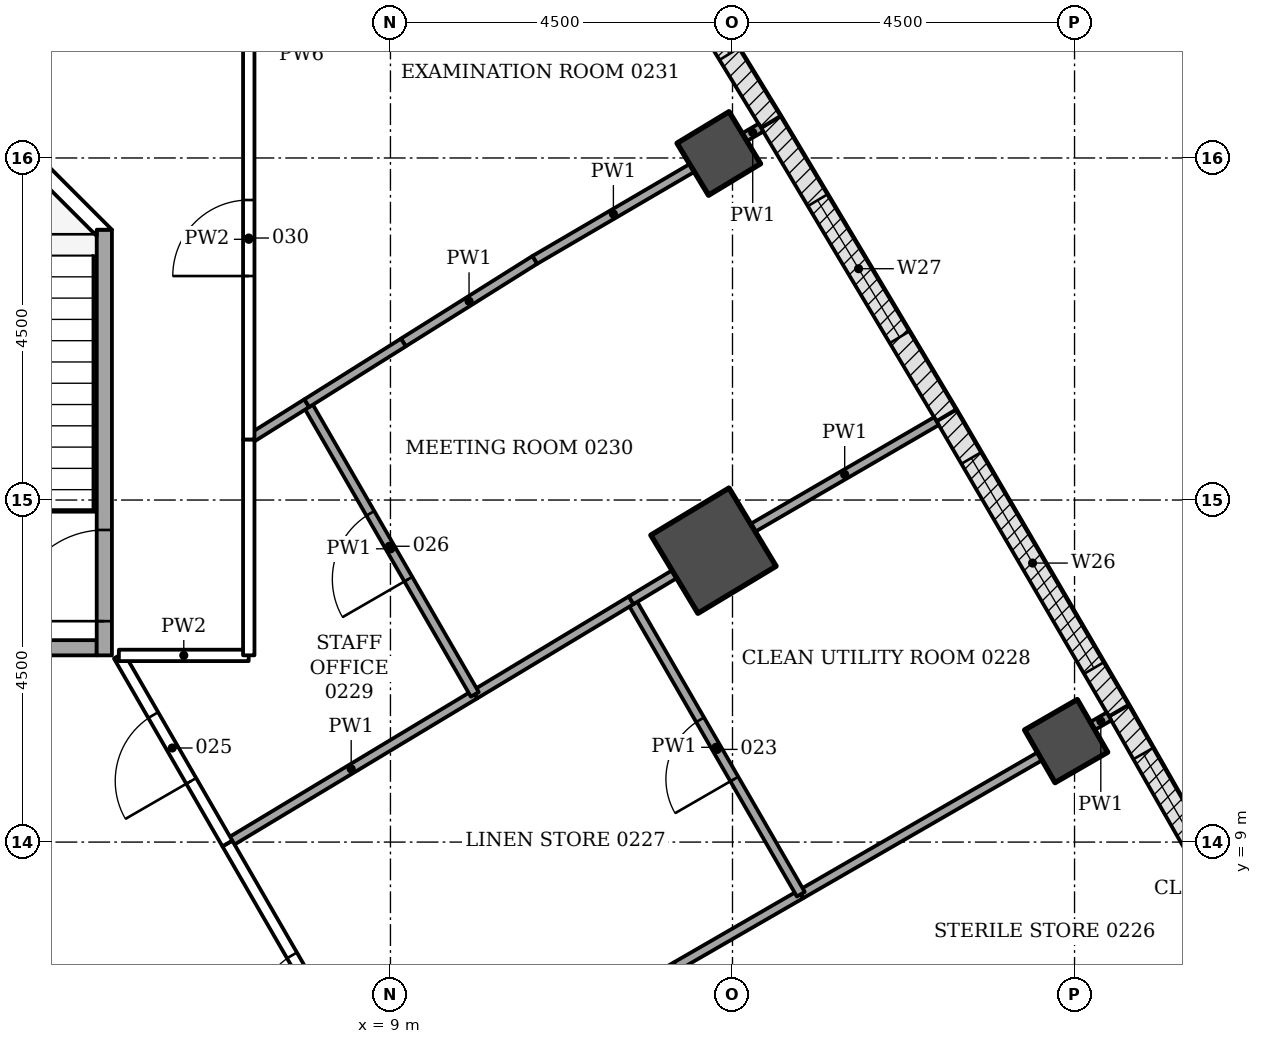
"""IFC4 building model, lengths in metres.
Left out: names, types, materials, properties, quantities, classifications, styles, units other than length and angle.
Written with IfcOpenShell. Run it as: python <this file> out.ifc"""

import sys

from ifc_helpers import new_model, si_unit, direction, frame, frame_2d, origin, origin_2d, place, context, subcontext, project, spatial, polyline, rectangle, outline, extrude, element, fill, save


model = new_model("IFC4")
c1 = context("Model", 3, precision=1e-05, world=origin(), true_north=direction((0.0, 1.0)))
c2 = subcontext(c1, "Body", "Model", "MODEL_VIEW")
j1 = project(units=[si_unit("LENGTHUNIT", "METRE"), si_unit("PLANEANGLEUNIT", "RADIAN")], contexts=[c1])
p1 = place(None, origin())
s1 = spatial("IfcSite", under=j1, at=p1, CompositionType="ELEMENT")
p2 = place(p1, origin())
s2 = spatial("IfcBuilding", under=s1, at=p2, CompositionType="ELEMENT")
p3 = place(p2, frame((0.0, 0.0, 10.5)))
s3 = spatial("IfcBuildingStorey", under=s2, at=p3, CompositionType="ELEMENT", Elevation=10.5)
p4 = place(p3, frame((13.25, 12.834, -0.25), z_axis=(0.0, 0.0, 1.0), x_axis=(0.856599929156, 0.515981163775, 0.0)))
e1 = element("IfcColumn", 1, at=p4, inside=s3, PredefinedType="COLUMN", context=c2, shape_type="SweptSolid", body=[
    extrude(rectangle(XDim=1.2, YDim=1.2, at=origin_2d()), origin(), (0.0, 0.0, 1.0), 4.5),
])
for number, where, z_axis, x_axis in (
    (2, (17.89, 10.329, -0.25), (0.0, 0.0, 1.0), (0.866, 0.5, 0.0)),
    (3, (13.32, 18.059, -0.25), (0.0, 0.0, 1.0), (0.856, 0.518, 0.0)),
):
    element("IfcColumn", number, at=place(p3, frame(where, z_axis=z_axis, x_axis=x_axis)), inside=s3, PredefinedType="COLUMN", context=c2, shape_type="SweptSolid", body=[
        extrude(rectangle(XDim=0.8, YDim=0.8, at=origin_2d()), origin(), (0.0, 0.0, 1.0), 4.5),
    ])
p5 = place(p3, frame((10.311, -4.703, -0.25), z_axis=(0.0, 0.0, 1.0), x_axis=(-0.500001446645, 0.866024568562, 0.0)))
e4 = element("IfcWall", 4, at=p5, inside=s3, PredefinedType="SHEAR", context=c2, shape_type="SweptSolid", body=[
    extrude(rectangle(XDim=18.458, YDim=0.7, at=frame_2d((9.229, 0.0))), origin(), (0.0, 0.0, 1.0), 4.5),
])
p6 = place(p5, frame((8.7, 0.0, 0.25)))
e5 = element("IfcOpeningElement", 5, at=p6, cuts=e4, PredefinedType="OPENING", context=c2, shape_type="SweptSolid", body=[
    extrude(rectangle(XDim=1.0, YDim=2.1, at=frame_2d((0.5, 1.05))), frame((0.0, 0.36, 0.0), z_axis=(0.0, -1.0, 0.0), x_axis=(1.0, 0.0, 0.0)), (0.0, 0.0, 1.0), 0.72),
])
p7 = place(p5, frame((4.002, 0.0, 0.25)))
e6 = element("IfcOpeningElement", 6, at=p7, cuts=e4, PredefinedType="OPENING", context=c2, shape_type="SweptSolid", body=[
    extrude(rectangle(XDim=0.9, YDim=2.1, at=frame_2d((0.45, 1.05))), frame((0.0, 0.36, 0.0), z_axis=(0.0, -1.0, 0.0), x_axis=(1.0, 0.0, 0.0)), (0.0, 0.0, 1.0), 0.72),
])
p8 = place(p5, frame((14.093, 0.0, 0.25)))
e7 = element("IfcOpeningElement", 7, at=p8, cuts=e4, PredefinedType="OPENING", context=c2, shape_type="SweptSolid", body=[
    extrude(rectangle(XDim=0.9, YDim=2.1, at=frame_2d((0.45, 1.05))), frame((0.0, 0.36, 0.0), z_axis=(0.0, -1.0, 0.0), x_axis=(1.0, 0.0, 0.0)), (0.0, 0.0, 1.0), 0.72),
])
p9 = place(p3, frame((18.583, 10.728, 0.0), z_axis=(0.0, 0.0, 1.0), x_axis=(0.495524760411, -0.868593812907, 0.0)))
e8 = element("IfcWall", 8, at=p9, inside=s3, PredefinedType="NOTDEFINED", context=c2, shape_type="SweptSolid", body=[
    extrude(rectangle(XDim=4.496, YDim=0.3, at=frame_2d((2.248, 0.0))), origin(), (0.0, 0.0, 1.0), 4.25),
])
p10 = place(p9, frame((0.648, 0.0, 0.8)))
e9 = element("IfcOpeningElement", 9, at=p10, cuts=e8, PredefinedType="OPENING", context=c2, shape_type="SweptSolid", body=[
    extrude(rectangle(XDim=3.2, YDim=2.7, at=frame_2d((1.6, 1.35))), frame((0.0, 0.16, 0.0), z_axis=(0.0, -1.0, 0.0), x_axis=(1.0, 0.0, 0.0)), (0.0, 0.0, 1.0), 0.32),
])
p11 = place(p3, frame((16.314, 14.612, 0.0), z_axis=(0.0, 0.0, 1.0), x_axis=(0.50445499627, -0.86343798662, 0.0)))
e10 = element("IfcWall", 10, at=p11, inside=s3, PredefinedType="NOTDEFINED", context=c2, shape_type="SweptSolid", body=[
    extrude(rectangle(XDim=4.496, YDim=0.3, at=frame_2d((2.248, 0.0))), origin(), (0.0, 0.0, 1.0), 4.25),
])
p12 = place(p11, frame((0.648, 0.0, 0.8)))
e11 = element("IfcOpeningElement", 11, at=p12, cuts=e10, PredefinedType="OPENING", context=c2, shape_type="SweptSolid", body=[
    extrude(rectangle(XDim=3.2, YDim=2.7, at=frame_2d((1.6, 1.35))), frame((0.0, 0.16, 0.0), z_axis=(0.0, -1.0, 0.0), x_axis=(1.0, 0.0, 0.0)), (0.0, 0.0, 1.0), 0.32),
])
p13 = place(p3, frame((14.005, 18.472, 0.0), z_axis=(0.0, 0.0, 1.0), x_axis=(0.513257465408, -0.858234684805, 0.0)))
e12 = element("IfcWall", 12, at=p13, inside=s3, PredefinedType="NOTDEFINED", context=c2, shape_type="SweptSolid", body=[
    extrude(rectangle(XDim=4.496, YDim=0.3, at=frame_2d((2.248, 0.0))), origin(), (0.0, 0.0, 1.0), 4.25),
])
p14 = place(p13, frame((1.198, 0.0, 0.8)))
e13 = element("IfcOpeningElement", 13, at=p14, cuts=e12, PredefinedType="OPENING", context=c2, shape_type="SweptSolid", body=[
    extrude(rectangle(XDim=2.1, YDim=3.0, at=frame_2d((1.05, 1.5))), frame((0.0, 0.16, 0.0), z_axis=(0.0, -1.0, 0.0), x_axis=(1.0, 0.0, 0.0)), (0.0, 0.0, 1.0), 0.32),
])
p15 = place(p3, frame((11.656, 22.309, 0.0), z_axis=(0.0, 0.0, 1.0), x_axis=(0.522078085402, -0.852897691838, 0.0)))
e14 = element("IfcWall", 14, at=p15, inside=s3, PredefinedType="NOTDEFINED", context=c2, shape_type="SweptSolid", body=[
    extrude(rectangle(XDim=4.496, YDim=0.3, at=frame_2d((2.248, 0.0))), origin(), (0.0, 0.0, 1.0), 4.25),
])
p16 = place(p15, frame((1.048, 0.0, 0.9)))
e15 = element("IfcOpeningElement", 15, at=p16, cuts=e14, PredefinedType="OPENING", context=c2, shape_type="SweptSolid", body=[
    extrude(rectangle(XDim=2.4, YDim=2.4, at=frame_2d((1.2, 1.2))), frame((0.0, 0.16, 0.0), z_axis=(0.0, -1.0, 0.0), x_axis=(1.0, 0.0, 0.0)), (0.0, 0.0, 1.0), 0.32),
])
p17 = place(p3, frame((5.135, 11.556, -0.25), z_axis=(0.0, 0.0, 1.0), x_axis=(-1.0, 0.0, 0.0)))
e16 = element("IfcWall", 16, at=p17, inside=s3, PredefinedType="SHEAR", context=c2, shape_type="SweptSolid", body=[
    extrude(rectangle(XDim=3.55, YDim=0.2, at=frame_2d((1.775, 0.0))), origin(), (0.0, 0.0, 1.0), 4.5),
])
p18 = place(p17, frame((1.175, 0.0, 0.25)))
e17 = element("IfcOpeningElement", 17, at=p18, cuts=e16, PredefinedType="OPENING", context=c2, shape_type="SweptSolid", body=[
    extrude(rectangle(XDim=1.2, YDim=2.1, at=frame_2d((0.6, 1.05))), frame((0.0, 0.11, 0.0), z_axis=(0.0, -1.0, 0.0), x_axis=(1.0, 0.0, 0.0)), (0.0, 0.0, 1.0), 0.22),
])
p19 = place(p3, frame((5.236, 11.456, -0.25), z_axis=(0.0, 0.0, 1.0), x_axis=(0.0, 1.0, 0.0)))
e18 = element("IfcWall", 18, at=p19, inside=s3, PredefinedType="SHEAR", context=c2, shape_type="SweptSolid", body=[
    extrude(rectangle(XDim=5.6, YDim=0.2, at=frame_2d((2.8, 0.0))), origin(), (0.0, 0.0, 1.0), 4.5),
])
p20 = place(p19, frame((0.45, 0.0, 0.25)))
e19 = element("IfcOpeningElement", 19, at=p20, cuts=e18, PredefinedType="OPENING", context=c2, shape_type="SweptSolid", body=[
    extrude(rectangle(XDim=1.2, YDim=2.1, at=frame_2d((0.6, 1.05))), frame((0.0, 0.11, 0.0), z_axis=(0.0, -1.0, 0.0), x_axis=(1.0, 0.0, 0.0)), (0.0, 0.0, 1.0), 0.22),
])
p21 = place(p3, frame((0.0, 0.0, -0.25)))
e20 = element("IfcWall", 20, at=p21, inside=s3, PredefinedType="SHEAR", context=c2, shape_type="SweptSolid", body=[
    extrude(outline(polyline([(5.336, 17.056), (3.736, 18.656), (1.586, 18.656), (1.586, 18.456), (3.653, 18.456), (5.135, 16.974), (5.135, 17.056), (5.135, 17.056), (5.135, 17.056), (5.135, 17.056), (5.135, 17.056), (5.135, 17.056), (5.135, 17.056), (5.135, 17.056), (5.135, 17.056), (5.135, 17.056), (5.135, 17.056), (5.135, 17.056), (5.135, 17.056), (5.135, 17.056), (5.135, 17.056), (5.135, 17.056), (5.135, 17.056), (5.336, 17.056)])), origin(), (0.0, 0.0, 1.0), 4.5),
])
p22 = place(p3, frame((9.03, 5.215, 0.0), z_axis=(0.0, 0.0, 1.0), x_axis=(-0.500239242508, 0.86588723299, 0.0)))
e21 = element("IfcWall", 21, at=p22, inside=s3, PredefinedType="PARTITIONING", context=c2, shape_type="SweptSolid", body=[
    extrude(rectangle(XDim=4.348, YDim=0.15, at=frame_2d((2.174, 0.0))), origin(), (0.0, 0.0, 1.0), 3.638),
])
p23 = place(p22, frame((1.75, 0.0, 0.0)))
e22 = element("IfcOpeningElement", 22, at=p23, cuts=e21, PredefinedType="OPENING", context=c2, shape_type="SweptSolid", body=[
    extrude(rectangle(XDim=0.9, YDim=2.1, at=frame_2d((0.45, 1.05))), frame((0.0, 0.085, 0.0), z_axis=(0.0, -1.0, 0.0), x_axis=(1.0, 0.0, 0.0)), (0.0, 0.0, 1.0), 0.17),
])
p24 = place(p3, frame((6.854, 8.982, 0.0), z_axis=(0.0, 0.0, 1.0), x_axis=(-0.499919889281, 0.866071650789, 0.0)))
e23 = element("IfcWall", 23, at=p24, inside=s3, PredefinedType="PARTITIONING", context=c2, shape_type="SweptSolid", body=[
    extrude(rectangle(XDim=2.854, YDim=0.15, at=frame_2d((1.427, 0.0))), origin(), (0.0, 0.0, 1.0), 3.638),
])
p25 = place(p24, frame((0.95, 0.0, 0.0)))
e24 = element("IfcOpeningElement", 24, at=p25, cuts=e23, PredefinedType="OPENING", context=c2, shape_type="SweptSolid", body=[
    extrude(rectangle(XDim=1.0, YDim=2.1, at=frame_2d((0.5, 1.05))), frame((0.0, 0.085, 0.0), z_axis=(0.0, -1.0, 0.0), x_axis=(1.0, 0.0, 0.0)), (0.0, 0.0, 1.0), 0.17),
])
p26 = place(p3, frame((5.427, 11.456, 0.0), z_axis=(0.0, 0.0, 1.0), x_axis=(1.0, 0.0, 0.0)))
e25 = element("IfcWall", 25, at=p26, inside=s3, PredefinedType="PARTITIONING", context=c2, shape_type="SweptSolid", body=[
    extrude(rectangle(XDim=1.708, YDim=0.15, at=frame_2d((0.854, 0.0))), origin(), (0.0, 0.0, 1.0), 4.25),
])
p27 = place(p3, frame((7.136, 11.457, 0.0), z_axis=(0.0, 0.0, 1.0), x_axis=(0.0, 1.0, 0.0)))
e26 = element("IfcWall", 26, at=p27, inside=s3, PredefinedType="PARTITIONING", context=c2, shape_type="SweptSolid", body=[
    extrude(rectangle(XDim=2.84, YDim=0.15, at=frame_2d((1.42, 0.0))), origin(), (0.0, 0.0, 1.0), 3.638),
])
p28 = place(p3, frame((7.136, 14.297, 0.0), z_axis=(0.0, 0.0, 1.0), x_axis=(0.0, 1.0, 0.0)))
e27 = element("IfcWall", 27, at=p28, inside=s3, PredefinedType="PARTITIONING", context=c2, shape_type="SweptSolid", body=[
    extrude(rectangle(XDim=5.266, YDim=0.15, at=frame_2d((2.633, 0.0))), origin(), (0.0, 0.0, 1.0), 3.638),
])
p29 = place(p28, frame((2.15, 0.0, 0.0)))
e28 = element("IfcOpeningElement", 28, at=p29, cuts=e27, PredefinedType="OPENING", context=c2, shape_type="SweptSolid", body=[
    extrude(rectangle(XDim=1.0, YDim=2.1, at=frame_2d((0.5, 1.05))), frame((0.0, 0.085, 0.0), z_axis=(0.0, -1.0, 0.0), x_axis=(1.0, 0.0, 0.0)), (0.0, 0.0, 1.0), 0.17),
])
p30 = place(p3, frame((12.755, 7.363, 0.0), z_axis=(0.0, 0.0, 1.0), x_axis=(-0.866173292352, -0.499743761959, 0.0)))
e29 = element("IfcWall", 29, at=p30, inside=s3, PredefinedType="PARTITIONING", context=c2, shape_type="SweptSolid", body=[
    extrude(rectangle(XDim=4.298, YDim=0.12, at=frame_2d((2.149, 0.0))), origin(), (0.0, 0.0, 1.0), 3.638),
])
p31 = place(p3, frame((14.4, 8.313, 0.0), z_axis=(0.0, 0.0, 1.0), x_axis=(-0.865980106173, -0.500078449558, 0.0)))
e30 = element("IfcWall", 30, at=p31, inside=s3, PredefinedType="PARTITIONING", context=c2, shape_type="SweptSolid", body=[
    extrude(rectangle(XDim=1.9, YDim=0.12, at=frame_2d((0.95, 0.0))), origin(), (0.0, 0.0, 1.0), 3.638),
])
p32 = place(p3, frame((17.543, 10.128, 0.0), z_axis=(0.0, 0.0, 1.0), x_axis=(-0.866039913117, -0.499974868256, 0.0)))
e31 = element("IfcWall", 31, at=p32, inside=s3, PredefinedType="PARTITIONING", context=c2, shape_type="SweptSolid", body=[
    extrude(rectangle(XDim=3.628, YDim=0.12, at=frame_2d((1.814, 0.0))), origin(), (0.0, 0.0, 1.0), 3.638),
])
p33 = place(p3, frame((18.454, 10.653, 0.0), z_axis=(0.0, 0.0, 1.0), x_axis=(-0.866558586415, -0.499075361355, 0.0)))
e32 = element("IfcWall", 32, at=p33, inside=s3, PredefinedType="PARTITIONING", context=c2, shape_type="SweptSolid", body=[
    extrude(rectangle(XDim=0.25, YDim=0.12, at=frame_2d((0.125, 0.0))), origin(), (0.0, 0.0, 1.0), 4.25),
])
p34 = place(p3, frame((14.399, 8.314, 0.0), z_axis=(0.0, 0.0, 1.0), x_axis=(-0.49998599166, 0.866033491352, 0.0)))
e33 = element("IfcWall", 33, at=p34, inside=s3, PredefinedType="PARTITIONING", context=c2, shape_type="SweptSolid", body=[
    extrude(rectangle(XDim=4.464, YDim=0.12, at=frame_2d((2.232, 0.0))), origin(), (0.0, 0.0, 1.0), 3.638),
])
p35 = place(p34, frame((1.75, 0.0, 0.0)))
e34 = element("IfcOpeningElement", 34, at=p35, cuts=e33, PredefinedType="OPENING", context=c2, shape_type="SweptSolid", body=[
    extrude(rectangle(XDim=0.9, YDim=2.1, at=frame_2d((0.45, 1.05))), frame((0.0, 0.07, 0.0), z_axis=(0.0, -1.0, 0.0), x_axis=(1.0, 0.0, 0.0)), (0.0, 0.0, 1.0), 0.14),
])
p36 = place(p3, frame((10.111, 10.942, 0.0), z_axis=(0.0, 0.0, 1.0), x_axis=(-0.856692501001, -0.515827450539, 0.0)))
e35 = element("IfcWall", 35, at=p36, inside=s3, PredefinedType="PARTITIONING", context=c2, shape_type="SweptSolid", body=[
    extrude(rectangle(XDim=3.8, YDim=0.12, at=frame_2d((1.9, 0.0))), origin(), (0.0, 0.0, 1.0), 3.638),
])
p37 = place(p3, frame((12.167, 12.181, 0.0), z_axis=(0.0, 0.0, 1.0), x_axis=(-0.856602650019, -0.515976646739, 0.0)))
e36 = element("IfcWall", 36, at=p37, inside=s3, PredefinedType="PARTITIONING", context=c2, shape_type="SweptSolid", body=[
    extrude(rectangle(XDim=2.399, YDim=0.12, at=frame_2d((1.199, 0.0))), origin(), (0.0, 0.0, 1.0), 3.638),
])
p38 = place(p3, frame((12.736, 12.524, 0.0), z_axis=(0.0, 0.0, 1.0), x_axis=(-0.856453764076, -0.516223740252, 0.0)))
e37 = element("IfcWall", 37, at=p38, inside=s3, PredefinedType="PARTITIONING", context=c2, shape_type="SweptSolid", body=[
    extrude(rectangle(XDim=0.665, YDim=0.12, at=frame_2d((0.332, 0.0))), origin(), (0.0, 0.0, 1.0), 3.638),
])
p39 = place(p3, frame((16.183, 14.538, 0.0), z_axis=(0.0, 0.0, 1.0), x_axis=(-0.864576979504, -0.50250039454, 0.0)))
e38 = element("IfcWall", 38, at=p39, inside=s3, PredefinedType="PARTITIONING", context=c2, shape_type="SweptSolid", body=[
    extrude(rectangle(XDim=2.792, YDim=0.12, at=frame_2d((1.396, 0.0))), origin(), (0.0, 0.0, 1.0), 3.633),
])
p40 = place(p3, frame((10.11, 10.943, 0.0), z_axis=(0.0, 0.0, 1.0), x_axis=(-0.49990879683, 0.866078053556, 0.0)))
e39 = element("IfcWall", 39, at=p40, inside=s3, PredefinedType="PARTITIONING", context=c2, shape_type="SweptSolid", body=[
    extrude(rectangle(XDim=4.423, YDim=0.12, at=frame_2d((2.211, 0.0))), origin(), (0.0, 0.0, 1.0), 3.638),
])
p41 = place(p40, frame((1.75, 0.0, 0.0)))
e40 = element("IfcOpeningElement", 40, at=p41, cuts=e39, PredefinedType="OPENING", context=c2, shape_type="SweptSolid", body=[
    extrude(rectangle(XDim=1.0, YDim=2.1, at=frame_2d((0.5, 1.05))), frame((0.0, 0.07, 0.0), z_axis=(0.0, -1.0, 0.0), x_axis=(1.0, 0.0, 0.0)), (0.0, 0.0, 1.0), 0.14),
])
p42 = place(p3, frame((7.899, 14.774, 0.0), z_axis=(0.0, 0.0, 1.0), x_axis=(-0.847402109943, -0.530951658877, 0.0)))
e41 = element("IfcWall", 41, at=p42, inside=s3, PredefinedType="PARTITIONING", context=c2, shape_type="SweptSolid", body=[
    extrude(rectangle(XDim=0.898, YDim=0.12, at=frame_2d((0.449, 0.0))), origin(), (0.0, 0.0, 1.0), 3.638),
])
p43 = place(p3, frame((12.968, 17.869, 0.0), z_axis=(0.0, 0.0, 1.0), x_axis=(-0.863161652457, -0.504927679701, 0.0)))
e42 = element("IfcWall", 42, at=p43, inside=s3, PredefinedType="PARTITIONING", context=c2, shape_type="SweptSolid", body=[
    extrude(rectangle(XDim=2.398, YDim=0.12, at=frame_2d((1.199, 0.0))), origin(), (0.0, 0.0, 1.0), 3.638),
])
p44 = place(p3, frame((10.898, 16.658, 0.0), z_axis=(0.0, 0.0, 1.0), x_axis=(-0.846907532623, -0.531740191435, 0.0)))
e43 = element("IfcWall", 43, at=p44, inside=s3, PredefinedType="PARTITIONING", context=c2, shape_type="SweptSolid", body=[
    extrude(rectangle(XDim=2.04, YDim=0.12, at=frame_2d((1.02, 0.0))), origin(), (0.0, 0.0, 1.0), 3.638),
])
p45 = place(p3, frame((9.17, 15.572, 0.0), z_axis=(0.0, 0.0, 1.0), x_axis=(-0.846881470123, -0.531781699161, 0.0)))
e44 = element("IfcWall", 44, at=p45, inside=s3, PredefinedType="PARTITIONING", context=c2, shape_type="SweptSolid", body=[
    extrude(rectangle(XDim=1.501, YDim=0.12, at=frame_2d((0.75, 0.0))), origin(), (0.0, 0.0, 1.0), 3.638),
])
p46 = place(p3, frame((13.874, 18.399, 0.0), z_axis=(0.0, 0.0, 1.0), x_axis=(-0.863885093979, -0.503688936151, 0.0)))
e45 = element("IfcWall", 45, at=p46, inside=s3, PredefinedType="PARTITIONING", context=c2, shape_type="SweptSolid", body=[
    extrude(rectangle(XDim=0.25, YDim=0.12, at=frame_2d((0.125, 0.0))), origin(), (0.0, 0.0, 1.0), 4.25),
])
p47 = place(p10, origin())
e46 = element("IfcWindow", 46, at=p47, inside=s3, PartitioningType="TRIPLE_PANEL_VERTICAL", PredefinedType="WINDOW", context=c2, shape_type="SweptSolid", body=[
    extrude(rectangle(XDim=3.2, YDim=2.7, at=frame_2d((1.6, 1.35))), frame((0.0, 0.03, 0.0), z_axis=(0.0, -1.0, 0.0), x_axis=(1.0, 0.0, 0.0)), (0.0, 0.0, 1.0), 0.06),
])
fill(e9, e46)
p48 = place(p12, origin())
e47 = element("IfcWindow", 47, at=p48, inside=s3, PartitioningType="TRIPLE_PANEL_VERTICAL", PredefinedType="WINDOW", context=c2, shape_type="SweptSolid", body=[
    extrude(rectangle(XDim=3.2, YDim=2.7, at=frame_2d((1.6, 1.35))), frame((0.0, 0.03, 0.0), z_axis=(0.0, -1.0, 0.0), x_axis=(1.0, 0.0, 0.0)), (0.0, 0.0, 1.0), 0.06),
])
fill(e11, e47)
p49 = place(p14, origin())
e48 = element("IfcWindow", 48, at=p49, inside=s3, PartitioningType="DOUBLE_PANEL_HORIZONTAL", PredefinedType="WINDOW", context=c2, shape_type="SweptSolid", body=[
    extrude(rectangle(XDim=2.1, YDim=3.0, at=frame_2d((1.05, 1.5))), frame((0.0, 0.03, 0.0), z_axis=(0.0, -1.0, 0.0), x_axis=(1.0, 0.0, 0.0)), (0.0, 0.0, 1.0), 0.06),
])
fill(e13, e48)
p50 = place(p16, origin())
e49 = element("IfcWindow", 49, at=p50, inside=s3, PartitioningType="DOUBLE_PANEL_VERTICAL", PredefinedType="WINDOW", context=c2, shape_type="SweptSolid", body=[
    extrude(rectangle(XDim=2.4, YDim=2.4, at=frame_2d((1.2, 1.2))), frame((0.0, 0.03, 0.0), z_axis=(0.0, -1.0, 0.0), x_axis=(1.0, 0.0, 0.0)), (0.0, 0.0, 1.0), 0.06),
])
fill(e15, e49)
p51 = place(p20, origin())
e50 = element("IfcDoor", 50, at=p51, inside=s3, OperationType="SINGLE_SWING_LEFT", PredefinedType="DOOR", context=c2, shape_type="SweptSolid", body=[
    extrude(rectangle(XDim=1.2, YDim=2.1, at=frame_2d((0.6, 1.05))), frame((0.0, 0.025, 0.0), z_axis=(0.0, -1.0, 0.0), x_axis=(1.0, 0.0, 0.0)), (0.0, 0.0, 1.0), 0.05),
])
fill(e19, e50)
p52 = place(p23, origin())
e51 = element("IfcDoor", 51, at=p52, inside=s3, OperationType="SINGLE_SWING_LEFT", PredefinedType="DOOR", context=c2, shape_type="SweptSolid", body=[
    extrude(rectangle(XDim=0.9, YDim=2.1, at=frame_2d((0.45, 1.05))), frame((0.0, 0.025, 0.0), z_axis=(0.0, -1.0, 0.0), x_axis=(1.0, 0.0, 0.0)), (0.0, 0.0, 1.0), 0.05),
])
fill(e22, e51)
p53 = place(p35, origin())
e52 = element("IfcDoor", 52, at=p53, inside=s3, OperationType="SINGLE_SWING_RIGHT", PredefinedType="DOOR", context=c2, shape_type="SweptSolid", body=[
    extrude(rectangle(XDim=0.9, YDim=2.1, at=frame_2d((0.45, 1.05))), frame((0.0, 0.025, 0.0), z_axis=(0.0, -1.0, 0.0), x_axis=(1.0, 0.0, 0.0)), (0.0, 0.0, 1.0), 0.05),
])
fill(e34, e52)
p54 = place(p25, origin())
e53 = element("IfcDoor", 53, at=p54, inside=s3, OperationType="SINGLE_SWING_LEFT", PredefinedType="DOOR", context=c2, shape_type="SweptSolid", body=[
    extrude(rectangle(XDim=1.0, YDim=2.1, at=frame_2d((0.5, 1.05))), frame((0.0, 0.025, 0.0), z_axis=(0.0, -1.0, 0.0), x_axis=(1.0, 0.0, 0.0)), (0.0, 0.0, 1.0), 0.05),
])
fill(e24, e53)
p55 = place(p41, origin())
e54 = element("IfcDoor", 54, at=p55, inside=s3, OperationType="SINGLE_SWING_LEFT", PredefinedType="DOOR", context=c2, shape_type="SweptSolid", body=[
    extrude(rectangle(XDim=1.0, YDim=2.1, at=frame_2d((0.5, 1.05))), frame((0.0, 0.025, 0.0), z_axis=(0.0, -1.0, 0.0), x_axis=(1.0, 0.0, 0.0)), (0.0, 0.0, 1.0), 0.05),
])
fill(e40, e54)
p56 = place(p29, origin())
e55 = element("IfcDoor", 55, at=p56, inside=s3, OperationType="SINGLE_SWING_LEFT", PredefinedType="DOOR", context=c2, shape_type="SweptSolid", body=[
    extrude(rectangle(XDim=1.0, YDim=2.1, at=frame_2d((0.5, 1.05))), frame((0.0, 0.025, 0.0), z_axis=(0.0, -1.0, 0.0), x_axis=(1.0, 0.0, 0.0)), (0.0, 0.0, 1.0), 0.05),
])
fill(e28, e55)
save(model, sys.argv[1])
